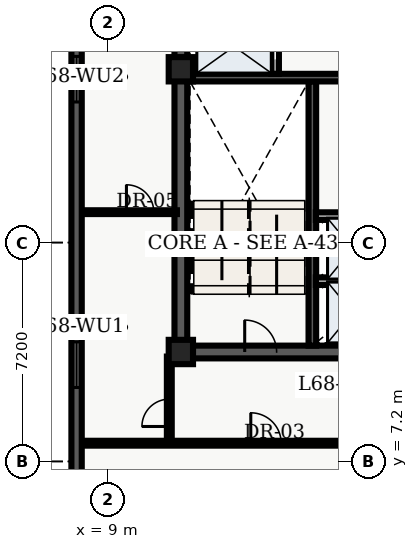
"""IFC4 building model, lengths in metres.
Left out: names, types, materials, properties, quantities, classifications, styles, units other than length and angle.
Written with IfcOpenShell. Run it as: python <this file> out.ifc"""

import sys

from ifc_helpers import new_model, entity, si_unit, converted_unit, direction, frame, origin_with_axes, origin_2d_with_axis, place, context, subcontext, project, spatial, polyline, rectangle, outline, extrude, element, fill, save


model = new_model("IFC4")
c1 = context("Model", 3, precision=1e-05, world=origin_with_axes(), true_north=direction((0.0, 1.0)))
c2 = subcontext(c1, "Body", "Model", "MODEL_VIEW")
j1 = project(units=[si_unit("LENGTHUNIT", "METRE"), converted_unit("PLANEANGLEUNIT", "DEGREE", entity("IfcPlaneAngleMeasure", 0.017), si_unit("PLANEANGLEUNIT", "RADIAN"), dimensions=[0, 0, 0, 0, 0, 0, 0])], contexts=[c1])
p1 = place(None, origin_with_axes())
s1 = spatial("IfcSite", under=j1, at=p1, CompositionType="ELEMENT")
p2 = place(p1, origin_with_axes())
s2 = spatial("IfcBuilding", under=s1, at=p2, CompositionType="ELEMENT")
p3 = place(p2, frame((0.0, 0.0, 276.3), z_axis=(0.0, 0.0, 1.0), x_axis=(1.0, 0.0, 0.0)))
s3 = spatial("IfcBuildingStorey", under=s2, at=p3, CompositionType="ELEMENT", Elevation=276.3)
p4 = place(p3, frame((11.4, 10.8, 0.0), z_axis=(0.0, 0.0, 1.0), x_axis=(0.0, 1.0, 0.0)))
e1 = element("IfcWall", 1, at=p4, inside=s3, PredefinedType="SHEAR", context=c2, shape_type="SweptSolid", body=[
    extrude(outline(polyline([(0.0, -0.21), (27.0, -0.21), (27.0, 0.21), (0.0, 0.21), (0.0, -0.21)])), origin_with_axes(), (0.0, 0.0, 1.0), 3.66),
])
p5 = place(p3, frame((11.4, 10.8, 0.0), z_axis=(0.0, 0.0, 1.0), x_axis=(1.0, 0.0, 0.0)))
e2 = element("IfcWall", 2, at=p5, inside=s3, PredefinedType="SHEAR", context=c2, shape_type="SweptSolid", body=[
    extrude(outline(polyline([(0.0, -0.21), (7.2, -0.21), (7.2, 0.21), (0.0, 0.21), (0.0, -0.21)])), origin_with_axes(), (0.0, 0.0, 1.0), 3.66),
])
p6 = place(p5, frame((2.625, 0.0, 0.0), z_axis=(0.0, 0.0, 1.0), x_axis=(1.0, 0.0, 0.0)))
e3 = element("IfcOpeningElement", 3, at=p6, cuts=e2, PredefinedType="OPENING", context=c2, shape_type="SweptSolid", body=[
    extrude(rectangle(XDim=1.05, YDim=0.44, at=origin_2d_with_axis()), origin_with_axes(), (0.0, 0.0, 1.0), 2.15),
])
p7 = place(p3, frame((15.725, 11.01, 0.0), z_axis=(0.0, 0.0, 1.0), x_axis=(0.0, 1.0, 0.0)))
e4 = element("IfcWall", 4, at=p7, inside=s3, PredefinedType="SHEAR", context=c2, shape_type="SweptSolid", body=[
    extrude(outline(polyline([(0.0, -0.125), (8.69, -0.125), (8.69, 0.125), (0.0, 0.125), (0.0, -0.125)])), origin_with_axes(), (0.0, 0.0, 1.0), 3.66),
])
p8 = place(p3, frame((11.61, 19.825, 0.0), z_axis=(0.0, 0.0, 1.0), x_axis=(1.0, 0.0, 0.0)))
e5 = element("IfcWall", 5, at=p8, inside=s3, PredefinedType="SHEAR", context=c2, shape_type="SweptSolid", body=[
    extrude(outline(polyline([(0.0, -0.125), (6.78, -0.125), (6.78, 0.125), (0.0, 0.125), (0.0, -0.125)])), origin_with_axes(), (0.0, 0.0, 1.0), 3.66),
])
p9 = place(p3, frame((14.5, 19.95, 0.0), z_axis=(0.0, 0.0, 1.0), x_axis=(0.0, 1.0, 0.0)))
e6 = element("IfcWall", 6, at=p9, inside=s3, PredefinedType="SOLIDWALL", context=c2, shape_type="SweptSolid", body=[
    extrude(outline(polyline([(0.0, -0.125), (6.25, -0.125), (6.25, 0.125), (0.0, 0.125), (0.0, -0.125)])), origin_with_axes(), (0.0, 0.0, 1.0), 2.7),
])
p10 = place(p9, frame((1.025, 0.0, 0.0), z_axis=(0.0, 0.0, 1.0), x_axis=(1.0, 0.0, 0.0)))
e7 = element("IfcOpeningElement", 7, at=p10, cuts=e6, PredefinedType="OPENING", context=c2, shape_type="SweptSolid", body=[
    extrude(rectangle(XDim=1.1, YDim=0.27, at=origin_2d_with_axis()), origin_with_axes(), (0.0, 0.0, 1.0), 2.15),
])
p11 = place(p9, frame((2.975, 0.0, 0.0), z_axis=(0.0, 0.0, 1.0), x_axis=(1.0, 0.0, 0.0)))
e8 = element("IfcOpeningElement", 8, at=p11, cuts=e6, PredefinedType="OPENING", context=c2, shape_type="SweptSolid", body=[
    extrude(rectangle(XDim=1.1, YDim=0.27, at=origin_2d_with_axis()), origin_with_axes(), (0.0, 0.0, 1.0), 2.15),
])
p12 = place(p9, frame((5.425, 0.0, 0.0), z_axis=(0.0, 0.0, 1.0), x_axis=(1.0, 0.0, 0.0)))
e9 = element("IfcOpeningElement", 9, at=p12, cuts=e6, PredefinedType="OPENING", context=c2, shape_type="SweptSolid", body=[
    extrude(rectangle(XDim=1.2, YDim=0.27, at=origin_2d_with_axis()), origin_with_axes(), (0.0, 0.0, 1.0), 2.15),
])
for number, where, z_axis, x_axis in (
    (10, (11.4, 10.8, 0.0), (0.0, 0.0, 1.0), (1.0, 0.0, 0.0)),
    (11, (11.4, 20.1, 0.0), (0.0, 0.0, 1.0), (1.0, 0.0, 0.0)),
):
    element("IfcColumn", number, at=place(p3, frame(where, z_axis=z_axis, x_axis=x_axis)), inside=s3, PredefinedType="COLUMN", context=c2, shape_type="SweptSolid", body=[
        extrude(rectangle(XDim=0.8, YDim=0.8, at=origin_2d_with_axis()), origin_with_axes(), (0.0, 0.0, 1.0), 3.9),
    ])
for number, where, z_axis, x_axis in (
    (12, (15.84, 13.13, 0.0), (0.0, 0.0, 1.0), (1.0, 0.0, 0.0)),
    (13, (15.84, 15.27, 0.0), (0.0, 0.0, 1.0), (1.0, 0.0, 0.0)),
):
    element("IfcWall", number, at=place(p3, frame(where, z_axis=z_axis, x_axis=x_axis)), inside=s3, PredefinedType="SOLIDWALL", context=c2, shape_type="SweptSolid", body=[
        extrude(outline(polyline([(0.0, -0.125), (2.46, -0.125), (2.46, 0.125), (0.0, 0.125), (0.0, -0.125)])), origin_with_axes(), (0.0, 0.0, 1.0), 2.7),
    ])
p13 = place(p3, frame((8.135, 7.8, 0.0), z_axis=(0.0, 0.0, 1.0), x_axis=(1.0, 0.0, 0.0)))
e14 = element("IfcWall", 14, at=p13, inside=s3, PredefinedType="PARTITIONING", context=c2, shape_type="SweptSolid", body=[
    extrude(outline(polyline([(0.0, -0.08), (12.165, -0.08), (12.165, 0.08), (0.0, 0.08), (0.0, -0.08)])), origin_with_axes(), (0.0, 0.0, 1.0), 2.7),
])
p14 = place(p13, frame((6.065, 0.0, 0.0), z_axis=(0.0, 0.0, 1.0), x_axis=(1.0, 0.0, 0.0)))
e15 = element("IfcOpeningElement", 15, at=p14, cuts=e14, PredefinedType="OPENING", context=c2, shape_type="SweptSolid", body=[
    extrude(rectangle(XDim=1.0, YDim=0.18, at=origin_2d_with_axis()), origin_with_axes(), (0.0, 0.0, 1.0), 2.15),
])
p15 = place(p3, frame((11.02, 7.8, 0.0), z_axis=(0.0, 0.0, 1.0), x_axis=(0.0, 1.0, 0.0)))
e16 = element("IfcWall", 16, at=p15, inside=s3, PredefinedType="PARTITIONING", context=c2, shape_type="SweptSolid", body=[
    extrude(outline(polyline([(0.0, -0.08), (2.85, -0.08), (2.85, 0.08), (0.0, 0.08), (0.0, -0.08)])), origin_with_axes(), (0.0, 0.0, 1.0), 2.7),
])
p16 = place(p15, frame((1.0, 0.0, 0.0), z_axis=(0.0, 0.0, 1.0), x_axis=(1.0, 0.0, 0.0)))
e17 = element("IfcOpeningElement", 17, at=p16, cuts=e16, PredefinedType="OPENING", context=c2, shape_type="SweptSolid", body=[
    extrude(rectangle(XDim=0.9, YDim=0.18, at=origin_2d_with_axis()), origin_with_axes(), (0.0, 0.0, 1.0), 2.15),
])
p17 = place(p3, frame((8.135, 15.4, 0.0), z_axis=(0.0, 0.0, 1.0), x_axis=(1.0, 0.0, 0.0)))
e18 = element("IfcWall", 18, at=p17, inside=s3, PredefinedType="PARTITIONING", context=c2, shape_type="SweptSolid", body=[
    extrude(outline(polyline([(0.0, -0.062), (3.135, -0.062), (3.135, 0.062), (0.0, 0.062), (0.0, -0.062)])), origin_with_axes(), (0.0, 0.0, 1.0), 2.7),
])
p18 = place(p17, frame((1.925, 0.0, 0.0), z_axis=(0.0, 0.0, 1.0), x_axis=(1.0, 0.0, 0.0)))
e19 = element("IfcOpeningElement", 19, at=p18, cuts=e18, PredefinedType="OPENING", context=c2, shape_type="SweptSolid", body=[
    extrude(rectangle(XDim=0.9, YDim=0.145, at=origin_2d_with_axis()), origin_with_axes(), (0.0, 0.0, 1.0), 2.15),
])
p19 = place(p3, frame((7.97, 2.74, 0.0), z_axis=(0.0, 0.0, 1.0), x_axis=(0.0, 1.0, 0.0)))
e20 = element("IfcWall", 20, at=p19, inside=s3, PredefinedType="SOLIDWALL", context=c2, shape_type="SweptSolid", body=[
    extrude(outline(polyline([(0.0, -0.17), (43.46, -0.17), (43.46, 0.17), (0.0, 0.17), (0.0, -0.17)])), origin_with_axes(), (0.0, 0.0, 1.0), 3.66),
])
p20 = place(p19, frame((2.948, 0.0, 0.45), z_axis=(0.0, 0.0, 1.0), x_axis=(1.0, 0.0, 0.0)))
e21 = element("IfcOpeningElement", 21, at=p20, cuts=e20, PredefinedType="OPENING", context=c2, shape_type="SweptSolid", body=[
    extrude(rectangle(XDim=1.5, YDim=0.36, at=origin_2d_with_axis()), origin_with_axes(), (0.0, 0.0, 1.0), 2.1),
])
p21 = place(p19, frame((7.643, 0.0, 0.45), z_axis=(0.0, 0.0, 1.0), x_axis=(1.0, 0.0, 0.0)))
e22 = element("IfcOpeningElement", 22, at=p21, cuts=e20, PredefinedType="OPENING", context=c2, shape_type="SweptSolid", body=[
    extrude(rectangle(XDim=1.5, YDim=0.36, at=origin_2d_with_axis()), origin_with_axes(), (0.0, 0.0, 1.0), 2.1),
])
p22 = place(p19, frame((17.034, 0.0, 0.45), z_axis=(0.0, 0.0, 1.0), x_axis=(1.0, 0.0, 0.0)))
e23 = element("IfcOpeningElement", 23, at=p22, cuts=e20, PredefinedType="OPENING", context=c2, shape_type="SweptSolid", body=[
    extrude(rectangle(XDim=1.5, YDim=0.36, at=origin_2d_with_axis()), origin_with_axes(), (0.0, 0.0, 1.0), 2.1),
])
p23 = place(p19, frame((26.426, 0.0, 0.45), z_axis=(0.0, 0.0, 1.0), x_axis=(1.0, 0.0, 0.0)))
e24 = element("IfcOpeningElement", 24, at=p23, cuts=e20, PredefinedType="OPENING", context=c2, shape_type="SweptSolid", body=[
    extrude(rectangle(XDim=1.5, YDim=0.36, at=origin_2d_with_axis()), origin_with_axes(), (0.0, 0.0, 1.0), 2.1),
])
p24 = place(p19, frame((31.571, 0.0, 0.45), z_axis=(0.0, 0.0, 1.0), x_axis=(1.0, 0.0, 0.0)))
e25 = element("IfcOpeningElement", 25, at=p24, cuts=e20, PredefinedType="OPENING", context=c2, shape_type="SweptSolid", body=[
    extrude(rectangle(XDim=1.5, YDim=0.36, at=origin_2d_with_axis()), origin_with_axes(), (0.0, 0.0, 1.0), 2.1),
])
p25 = place(p19, frame((35.817, 0.0, 0.45), z_axis=(0.0, 0.0, 1.0), x_axis=(1.0, 0.0, 0.0)))
e26 = element("IfcOpeningElement", 26, at=p25, cuts=e20, PredefinedType="OPENING", context=c2, shape_type="SweptSolid", body=[
    extrude(rectangle(XDim=1.5, YDim=0.36, at=origin_2d_with_axis()), origin_with_axes(), (0.0, 0.0, 1.0), 2.1),
])
p26 = place(p19, frame((40.512, 0.0, 0.45), z_axis=(0.0, 0.0, 1.0), x_axis=(1.0, 0.0, 0.0)))
e27 = element("IfcOpeningElement", 27, at=p26, cuts=e20, PredefinedType="OPENING", context=c2, shape_type="SweptSolid", body=[
    extrude(rectangle(XDim=1.5, YDim=0.36, at=origin_2d_with_axis()), origin_with_axes(), (0.0, 0.0, 1.0), 2.1),
])
p27 = place(p9, frame((1.025, 0.0, 0.0), z_axis=(0.0, 0.0, 1.0), x_axis=(1.0, 0.0, 0.0)))
e28 = element("IfcDoor", 28, at=p27, inside=s3, OperationType="SLIDING_TO_LEFT", PredefinedType="DOOR", context=c2, shape_type="SweptSolid", body=[
    extrude(rectangle(XDim=1.1, YDim=0.09, at=origin_2d_with_axis()), origin_with_axes(), (0.0, 0.0, 1.0), 2.15),
])
fill(e7, e28)
p28 = place(p5, frame((2.625, 0.0, 0.0), z_axis=(0.0, 0.0, 1.0), x_axis=(1.0, 0.0, 0.0)))
e29 = element("IfcDoor", 29, at=p28, inside=s3, OperationType="SINGLE_SWING_LEFT", PredefinedType="DOOR", context=c2, shape_type="SweptSolid", body=[
    extrude(rectangle(XDim=1.05, YDim=0.09, at=origin_2d_with_axis()), origin_with_axes(), (0.0, 0.0, 1.0), 2.15),
])
fill(e3, e29)
p29 = place(p17, frame((1.925, 0.0, 0.0), z_axis=(0.0, 0.0, 1.0), x_axis=(1.0, 0.0, 0.0)))
e30 = element("IfcDoor", 30, at=p29, inside=s3, OperationType="SINGLE_SWING_LEFT", PredefinedType="DOOR", context=c2, shape_type="SweptSolid", body=[
    extrude(rectangle(XDim=0.9, YDim=0.075, at=origin_2d_with_axis()), origin_with_axes(), (0.0, 0.0, 1.0), 2.15),
])
fill(e19, e30)
p30 = place(p15, frame((1.0, 0.0, 0.0), z_axis=(0.0, 0.0, 1.0), x_axis=(1.0, 0.0, 0.0)))
e31 = element("IfcDoor", 31, at=p30, inside=s3, OperationType="SINGLE_SWING_LEFT", PredefinedType="DOOR", context=c2, shape_type="SweptSolid", body=[
    extrude(rectangle(XDim=0.9, YDim=0.09, at=origin_2d_with_axis()), origin_with_axes(), (0.0, 0.0, 1.0), 2.15),
])
fill(e17, e31)
p31 = place(p13, frame((6.065, 0.0, 0.0), z_axis=(0.0, 0.0, 1.0), x_axis=(1.0, 0.0, 0.0)))
e32 = element("IfcDoor", 32, at=p31, inside=s3, OperationType="SINGLE_SWING_LEFT", PredefinedType="DOOR", context=c2, shape_type="SweptSolid", body=[
    extrude(rectangle(XDim=1.0, YDim=0.09, at=origin_2d_with_axis()), origin_with_axes(), (0.0, 0.0, 1.0), 2.15),
])
fill(e15, e32)
p32 = place(p19, frame((7.643, 0.0, 0.45), z_axis=(0.0, 0.0, 1.0), x_axis=(1.0, 0.0, 0.0)))
e33 = element("IfcWindow", 33, at=p32, inside=s3, PredefinedType="WINDOW", context=c2, shape_type="SweptSolid", body=[
    extrude(rectangle(XDim=1.5, YDim=0.09, at=origin_2d_with_axis()), origin_with_axes(), (0.0, 0.0, 1.0), 2.1),
])
fill(e22, e33)
p33 = place(p19, frame((17.034, 0.0, 0.45), z_axis=(0.0, 0.0, 1.0), x_axis=(1.0, 0.0, 0.0)))
e34 = element("IfcWindow", 34, at=p33, inside=s3, PredefinedType="WINDOW", context=c2, shape_type="SweptSolid", body=[
    extrude(rectangle(XDim=1.5, YDim=0.09, at=origin_2d_with_axis()), origin_with_axes(), (0.0, 0.0, 1.0), 2.1),
])
fill(e23, e34)
save(model, sys.argv[1])
